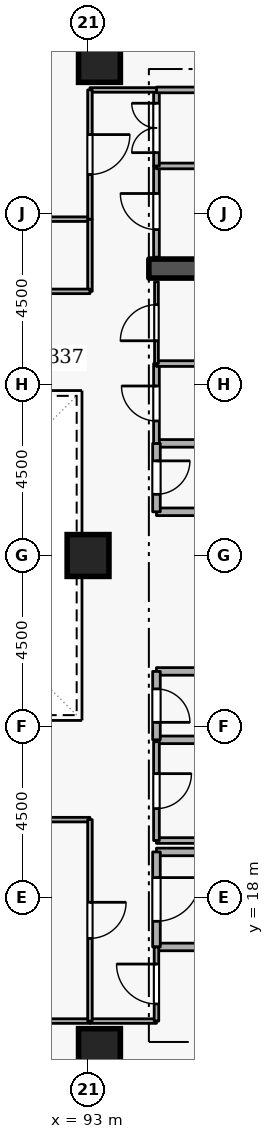
"""IFC4 building model, lengths in metres.
Left out: names, types, materials, properties, quantities, classifications, styles, units other than length and angle.
Written with IfcOpenShell. Run it as: python <this file> out.ifc"""

import sys

from ifc_helpers import new_model, si_unit, direction, frame, frame_2d, origin, origin_2d, place, context, subcontext, project, spatial, rectangle, extrude, element, fill, save


model = new_model("IFC4")
c1 = context("Model", 3, precision=1e-05, world=origin(), true_north=direction((0.0, 1.0)))
c2 = subcontext(c1, "Body", "Model", "MODEL_VIEW")
j1 = project(units=[si_unit("LENGTHUNIT", "METRE"), si_unit("PLANEANGLEUNIT", "RADIAN")], contexts=[c1])
p1 = place(None, origin())
s1 = spatial("IfcSite", under=j1, at=p1, CompositionType="ELEMENT")
p2 = place(p1, origin())
s2 = spatial("IfcBuilding", under=s1, at=p2, CompositionType="ELEMENT")
p3 = place(p2, frame((0.0, 0.0, 196.5)))
s3 = spatial("IfcBuildingStorey", under=s2, at=p3, CompositionType="ELEMENT", Elevation=196.5)
p4 = place(p3, frame((94.6, 34.55, 0.0), z_axis=(0.0, 0.0, 1.0), x_axis=(1.0, 0.0, 0.0)))
e1 = element("IfcWall", 1, at=p4, inside=s3, PredefinedType="SHEAR", context=c2, shape_type="SweptSolid", body=[
    extrude(rectangle(XDim=5.8, YDim=0.5, at=frame_2d((2.9, 0.0))), origin(), (0.0, 0.0, 1.0), 3.6),
])
for number, where, z_axis, x_axis in (
    (2, (93.3, 14.0, 0.0), (0.0, 0.0, 1.0), (1.0, 0.0, 0.0)),
    (3, (93.3, 40.0, 0.0), (0.0, 0.0, 1.0), (1.0, 0.0, 0.0)),
    (4, (93.0, 27.0, 0.0), (0.0, 0.0, 1.0), (1.0, 0.0, 0.0)),
):
    element("IfcColumn", number, at=place(p3, frame(where, z_axis=z_axis, x_axis=x_axis)), inside=s3, PredefinedType="COLUMN", context=c2, shape_type="SweptSolid", body=[
        extrude(rectangle(XDim=1.1, YDim=1.1, at=origin_2d()), origin(), (0.0, 0.0, 1.0), 3.6),
    ])
p5 = place(p3, frame((94.8, 16.7, 0.0), z_axis=(0.0, 0.0, 1.0), x_axis=(1.0, 0.0, 0.0)))
e5 = element("IfcWall", 5, at=p5, inside=s3, PredefinedType="STANDARD", context=c2, shape_type="SweptSolid", body=[
    extrude(rectangle(XDim=5.7, YDim=0.2, at=frame_2d((2.85, 0.0))), origin(), (0.0, 0.0, 1.0), 3.32),
])
p6 = place(p3, frame((97.1, 19.2, 0.0), z_axis=(0.0, 0.0, 1.0), x_axis=(-1.0, 0.0, 0.0)))
e6 = element("IfcWall", 6, at=p6, inside=s3, PredefinedType="STANDARD", context=c2, shape_type="SweptSolid", body=[
    extrude(rectangle(XDim=2.3, YDim=0.2, at=frame_2d((1.15, 0.0))), origin(), (0.0, 0.0, 1.0), 2.525),
])
p7 = place(p3, frame((94.8, 19.2, 0.0), z_axis=(0.0, 0.0, 1.0), x_axis=(0.0, -1.0, 0.0)))
e7 = element("IfcWall", 7, at=p7, inside=s3, PredefinedType="STANDARD", context=c2, shape_type="SweptSolid", body=[
    extrude(rectangle(XDim=2.5, YDim=0.2, at=frame_2d((1.25, 0.0))), origin(), (0.0, 0.0, 1.0), 3.32),
])
p8 = place(p7, frame((0.675, 0.0, 0.0)))
e8 = element("IfcOpeningElement", 8, at=p8, cuts=e7, PredefinedType="OPENING", context=c2, shape_type="SweptSolid", body=[
    extrude(rectangle(XDim=1.15, YDim=2.1, at=frame_2d((0.575, 1.05))), frame((0.0, 0.11, 0.0), z_axis=(0.0, -1.0, 0.0), x_axis=(1.0, 0.0, 0.0)), (0.0, 0.0, 1.0), 0.22),
])
for number, where, z_axis, x_axis in (
    (9, (94.8, 28.15, 0.0), (0.0, 0.0, 1.0), (1.0, 0.0, 0.0)),
    (10, (96.85, 29.95, 0.0), (0.0, 0.0, 1.0), (-1.0, 0.0, 0.0)),
):
    element("IfcWall", number, at=place(p3, frame(where, z_axis=z_axis, x_axis=x_axis)), inside=s3, PredefinedType="STANDARD", context=c2, shape_type="SweptSolid", body=[
        extrude(rectangle(XDim=2.05, YDim=0.2, at=frame_2d((1.025, 0.0))), origin(), (0.0, 0.0, 1.0), 3.32),
    ])
p9 = place(p3, frame((94.8, 29.95, 0.0), z_axis=(0.0, 0.0, 1.0), x_axis=(0.0, -1.0, 0.0)))
e11 = element("IfcWall", 11, at=p9, inside=s3, PredefinedType="STANDARD", context=c2, shape_type="SweptSolid", body=[
    extrude(rectangle(XDim=1.8, YDim=0.2, at=frame_2d((0.9, 0.0))), origin(), (0.0, 0.0, 1.0), 3.32),
])
p10 = place(p9, frame((0.46, 0.0, 0.0)))
e12 = element("IfcOpeningElement", 12, at=p10, cuts=e11, PredefinedType="OPENING", context=c2, shape_type="SweptSolid", body=[
    extrude(rectangle(XDim=0.88, YDim=2.04, at=frame_2d((0.44, 1.02))), frame((0.0, 0.11, 0.0), z_axis=(0.0, -1.0, 0.0), x_axis=(1.0, 0.0, 0.0)), (0.0, 0.0, 1.0), 0.22),
])
for number, where, z_axis, x_axis in (
    (13, (94.8, 22.15, 0.0), (0.0, 0.0, 1.0), (1.0, 0.0, 0.0)),
    (14, (96.85, 23.95, 0.0), (0.0, 0.0, 1.0), (-1.0, 0.0, 0.0)),
):
    element("IfcWall", number, at=place(p3, frame(where, z_axis=z_axis, x_axis=x_axis)), inside=s3, PredefinedType="STANDARD", context=c2, shape_type="SweptSolid", body=[
        extrude(rectangle(XDim=2.05, YDim=0.2, at=frame_2d((1.025, 0.0))), origin(), (0.0, 0.0, 1.0), 3.32),
    ])
p11 = place(p3, frame((94.8, 23.95, 0.0), z_axis=(0.0, 0.0, 1.0), x_axis=(0.0, -1.0, 0.0)))
e15 = element("IfcWall", 15, at=p11, inside=s3, PredefinedType="STANDARD", context=c2, shape_type="SweptSolid", body=[
    extrude(rectangle(XDim=1.8, YDim=0.2, at=frame_2d((0.9, 0.0))), origin(), (0.0, 0.0, 1.0), 3.32),
])
p12 = place(p11, frame((0.46, 0.0, 0.0)))
e16 = element("IfcOpeningElement", 16, at=p12, cuts=e15, PredefinedType="OPENING", context=c2, shape_type="SweptSolid", body=[
    extrude(rectangle(XDim=0.88, YDim=2.04, at=frame_2d((0.44, 1.02))), frame((0.0, 0.11, 0.0), z_axis=(0.0, -1.0, 0.0), x_axis=(1.0, 0.0, 0.0)), (0.0, 0.0, 1.0), 0.22),
])
p13 = place(p3, frame((94.8, 19.5, 0.0), z_axis=(0.0, 0.0, 1.0), x_axis=(1.0, 0.0, 0.0)))
e17 = element("IfcWall", 17, at=p13, inside=s3, PredefinedType="PARTITIONING", context=c2, shape_type="SweptSolid", body=[
    extrude(rectangle(XDim=2.05, YDim=0.15, at=frame_2d((1.025, 0.0))), origin(), (0.0, 0.0, 1.0), 2.525),
])
p14 = place(p3, frame((94.8, 22.1, 0.0), z_axis=(0.0, 0.0, 1.0), x_axis=(0.0, -1.0, 0.0)))
e18 = element("IfcWall", 18, at=p14, inside=s3, PredefinedType="PARTITIONING", context=c2, shape_type="SweptSolid", body=[
    extrude(rectangle(XDim=2.6, YDim=0.15, at=frame_2d((1.3, 0.0))), origin(), (0.0, 0.0, 1.0), 3.32),
])
p15 = place(p14, frame((0.84, 0.0, 0.0)))
e19 = element("IfcOpeningElement", 19, at=p15, cuts=e18, PredefinedType="OPENING", context=c2, shape_type="SweptSolid", body=[
    extrude(rectangle(XDim=0.92, YDim=2.08, at=frame_2d((0.46, 1.04))), frame((0.0, 0.085, 0.0), z_axis=(0.0, -1.0, 0.0), x_axis=(1.0, 0.0, 0.0)), (0.0, 0.0, 1.0), 0.17),
])
p16 = place(p3, frame((94.8, 29.95, 0.0), z_axis=(0.0, 0.0, 1.0), x_axis=(0.0, 1.0, 0.0)))
e20 = element("IfcWall", 20, at=p16, inside=s3, PredefinedType="PARTITIONING", context=c2, shape_type="SweptSolid", body=[
    extrude(rectangle(XDim=2.1, YDim=0.15, at=frame_2d((1.05, 0.0))), origin(), (0.0, 0.0, 1.0), 3.32),
])
p17 = place(p16, frame((0.59, 0.0, 0.0)))
e21 = element("IfcOpeningElement", 21, at=p17, cuts=e20, PredefinedType="OPENING", context=c2, shape_type="SweptSolid", body=[
    extrude(rectangle(XDim=0.92, YDim=2.08, at=frame_2d((0.46, 1.04))), frame((0.0, 0.085, 0.0), z_axis=(0.0, -1.0, 0.0), x_axis=(1.0, 0.0, 0.0)), (0.0, 0.0, 1.0), 0.17),
])
p18 = place(p3, frame((94.8, 32.05, 0.0), z_axis=(0.0, 0.0, 1.0), x_axis=(1.0, 0.0, 0.0)))
e22 = element("IfcWall", 22, at=p18, inside=s3, PredefinedType="PARTITIONING", context=c2, shape_type="SweptSolid", body=[
    extrude(rectangle(XDim=2.05, YDim=0.15, at=frame_2d((1.025, 0.0))), origin(), (0.0, 0.0, 1.0), 3.32),
])
p19 = place(p3, frame((94.8, 32.05, 0.0), z_axis=(0.0, 0.0, 1.0), x_axis=(0.0, 1.0, 0.0)))
e23 = element("IfcWall", 23, at=p19, inside=s3, PredefinedType="PARTITIONING", context=c2, shape_type="SweptSolid", body=[
    extrude(rectangle(XDim=2.15, YDim=0.1, at=frame_2d((1.075, 0.0))), origin(), (0.0, 0.0, 1.0), 3.32),
])
p20 = place(p19, frame((0.6, 0.0, 0.0)))
e24 = element("IfcOpeningElement", 24, at=p20, cuts=e23, PredefinedType="OPENING", context=c2, shape_type="SweptSolid", body=[
    extrude(rectangle(XDim=0.95, YDim=2.1, at=frame_2d((0.475, 1.05))), frame((0.0, 0.06, 0.0), z_axis=(0.0, -1.0, 0.0), x_axis=(1.0, 0.0, 0.0)), (0.0, 0.0, 1.0), 0.12),
])
p21 = place(p3, frame((94.8, 34.85, 0.0), z_axis=(0.0, 0.0, 1.0), x_axis=(0.0, 1.0, 0.0)))
e25 = element("IfcWall", 25, at=p21, inside=s3, PredefinedType="PARTITIONING", context=c2, shape_type="SweptSolid", body=[
    extrude(rectangle(XDim=2.4, YDim=0.15, at=frame_2d((1.2, 0.0))), origin(), (0.0, 0.0, 1.0), 3.32),
])
p22 = place(p21, frame((0.725, 0.0, 0.0)))
e26 = element("IfcOpeningElement", 26, at=p22, cuts=e25, PredefinedType="OPENING", context=c2, shape_type="SweptSolid", body=[
    extrude(rectangle(XDim=0.95, YDim=2.1, at=frame_2d((0.475, 1.05))), frame((0.0, 0.085, 0.0), z_axis=(0.0, -1.0, 0.0), x_axis=(1.0, 0.0, 0.0)), (0.0, 0.0, 1.0), 0.17),
])
p23 = place(p3, frame((94.8, 37.25, 0.0), z_axis=(0.0, 0.0, 1.0), x_axis=(1.0, 0.0, 0.0)))
e27 = element("IfcWall", 27, at=p23, inside=s3, PredefinedType="PARTITIONING", context=c2, shape_type="SweptSolid", body=[
    extrude(rectangle(XDim=5.65, YDim=0.15, at=frame_2d((2.825, 0.0))), origin(), (0.0, 0.0, 1.0), 3.32),
])
p24 = place(p3, frame((94.8, 37.25, 0.0), z_axis=(0.0, 0.0, 1.0), x_axis=(0.0, 1.0, 0.0)))
e28 = element("IfcWall", 28, at=p24, inside=s3, PredefinedType="PARTITIONING", context=c2, shape_type="SweptSolid", body=[
    extrude(rectangle(XDim=2.0, YDim=0.15, at=frame_2d((1.0, 0.0))), origin(), (0.0, 0.0, 1.0), 3.32),
])
p25 = place(p24, frame((0.35, 0.0, 0.0)))
e29 = element("IfcOpeningElement", 29, at=p25, cuts=e28, PredefinedType="OPENING", context=c2, shape_type="SweptSolid", body=[
    extrude(rectangle(XDim=1.3, YDim=2.12, at=frame_2d((0.65, 1.06))), frame((0.0, 0.085, 0.0), z_axis=(0.0, -1.0, 0.0), x_axis=(1.0, 0.0, 0.0)), (0.0, 0.0, 1.0), 0.17),
])
p26 = place(p3, frame((94.8, 39.25, 0.0), z_axis=(0.0, 0.0, 1.0), x_axis=(1.0, 0.0, 0.0)))
e30 = element("IfcWall", 30, at=p26, inside=s3, PredefinedType="PARTITIONING", context=c2, shape_type="SweptSolid", body=[
    extrude(rectangle(XDim=5.65, YDim=0.15, at=frame_2d((2.825, 0.0))), origin(), (0.0, 0.0, 1.0), 3.32),
])
p27 = place(p3, frame((88.5, 14.75, 0.0), z_axis=(0.0, 0.0, 1.0), x_axis=(1.0, 0.0, 0.0)))
e31 = element("IfcWall", 31, at=p27, inside=s3, PredefinedType="PARTITIONING", context=c2, shape_type="SweptSolid", body=[
    extrude(rectangle(XDim=4.55, YDim=0.12, at=frame_2d((2.275, 0.0))), origin(), (0.0, 0.0, 1.0), 3.32),
])
p28 = place(p3, frame((93.05, 14.75, 0.0), z_axis=(0.0, 0.0, 1.0), x_axis=(1.0, 0.0, 0.0)))
e32 = element("IfcWall", 32, at=p28, inside=s3, PredefinedType="PARTITIONING", context=c2, shape_type="SweptSolid", body=[
    extrude(rectangle(XDim=1.75, YDim=0.12, at=frame_2d((0.875, 0.0))), origin(), (0.0, 0.0, 1.0), 3.32),
])
p29 = place(p3, frame((94.8, 14.75, 0.0), z_axis=(0.0, 0.0, 1.0), x_axis=(0.0, 1.0, 0.0)))
e33 = element("IfcWall", 33, at=p29, inside=s3, PredefinedType="PARTITIONING", context=c2, shape_type="SweptSolid", body=[
    extrude(rectangle(XDim=1.95, YDim=0.12, at=frame_2d((0.975, 0.0))), origin(), (0.0, 0.0, 1.0), 3.32),
])
p30 = place(p29, frame((0.45, 0.0, 0.0)))
e34 = element("IfcOpeningElement", 34, at=p30, cuts=e33, PredefinedType="OPENING", context=c2, shape_type="SweptSolid", body=[
    extrude(rectangle(XDim=1.05, YDim=2.1, at=frame_2d((0.525, 1.05))), frame((0.0, 0.07, 0.0), z_axis=(0.0, -1.0, 0.0), x_axis=(1.0, 0.0, 0.0)), (0.0, 0.0, 1.0), 0.14),
])
p31 = place(p3, frame((88.5, 20.05, 0.0), z_axis=(0.0, 0.0, 1.0), x_axis=(1.0, 0.0, 0.0)))
e35 = element("IfcWall", 35, at=p31, inside=s3, PredefinedType="PARTITIONING", context=c2, shape_type="SweptSolid", body=[
    extrude(rectangle(XDim=4.55, YDim=0.12, at=frame_2d((2.275, 0.0))), origin(), (0.0, 0.0, 1.0), 3.32),
])
p32 = place(p3, frame((93.05, 20.05, 0.0), z_axis=(0.0, 0.0, 1.0), x_axis=(0.0, -1.0, 0.0)))
e36 = element("IfcWall", 36, at=p32, inside=s3, PredefinedType="PARTITIONING", context=c2, shape_type="SweptSolid", body=[
    extrude(rectangle(XDim=5.3, YDim=0.12, at=frame_2d((2.65, 0.0))), origin(), (0.0, 0.0, 1.0), 3.32),
])
p33 = place(p32, frame((2.175, 0.0, 0.0)))
e37 = element("IfcOpeningElement", 37, at=p33, cuts=e36, PredefinedType="OPENING", context=c2, shape_type="SweptSolid", body=[
    extrude(rectangle(XDim=0.95, YDim=2.1, at=frame_2d((0.475, 1.05))), frame((0.0, 0.07, 0.0), z_axis=(0.0, -1.0, 0.0), x_axis=(1.0, 0.0, 0.0)), (0.0, 0.0, 1.0), 0.14),
])
p34 = place(p3, frame((88.5, 35.85, 0.0), z_axis=(0.0, 0.0, 1.0), x_axis=(1.0, 0.0, 0.0)))
e38 = element("IfcWall", 38, at=p34, inside=s3, PredefinedType="PARTITIONING", context=c2, shape_type="SweptSolid", body=[
    extrude(rectangle(XDim=4.55, YDim=0.12, at=frame_2d((2.275, 0.0))), origin(), (0.0, 0.0, 1.0), 3.32),
])
p35 = place(p3, frame((93.05, 35.85, 0.0), z_axis=(0.0, 0.0, 1.0), x_axis=(0.0, -1.0, 0.0)))
e39 = element("IfcWall", 39, at=p35, inside=s3, PredefinedType="PARTITIONING", context=c2, shape_type="SweptSolid", body=[
    extrude(rectangle(XDim=1.9, YDim=0.12, at=frame_2d((0.95, 0.0))), origin(), (0.0, 0.0, 1.0), 3.32),
])
p36 = place(p3, frame((93.05, 33.95, 0.0), z_axis=(0.0, 0.0, 1.0), x_axis=(-1.0, 0.0, 0.0)))
e40 = element("IfcWall", 40, at=p36, inside=s3, PredefinedType="PARTITIONING", context=c2, shape_type="SweptSolid", body=[
    extrude(rectangle(XDim=4.55, YDim=0.12, at=frame_2d((2.275, 0.0))), origin(), (0.0, 0.0, 1.0), 3.32),
])
p37 = place(p36, frame((1.8, 0.0, 0.0)))
e41 = element("IfcOpeningElement", 41, at=p37, cuts=e40, PredefinedType="OPENING", context=c2, shape_type="SweptSolid", body=[
    extrude(rectangle(XDim=0.95, YDim=2.1, at=frame_2d((0.475, 1.05))), frame((0.0, 0.07, 0.0), z_axis=(0.0, -1.0, 0.0), x_axis=(1.0, 0.0, 0.0)), (0.0, 0.0, 1.0), 0.14),
])
p38 = place(p3, frame((94.8, 39.25, 0.0), z_axis=(0.0, 0.0, 1.0), x_axis=(-1.0, 0.0, 0.0)))
e42 = element("IfcWall", 42, at=p38, inside=s3, PredefinedType="PARTITIONING", context=c2, shape_type="SweptSolid", body=[
    extrude(rectangle(XDim=1.75, YDim=0.12, at=frame_2d((0.875, 0.0))), origin(), (0.0, 0.0, 1.0), 3.32),
])
p39 = place(p3, frame((93.05, 39.25, 0.0), z_axis=(0.0, 0.0, 1.0), x_axis=(0.0, -1.0, 0.0)))
e43 = element("IfcWall", 43, at=p39, inside=s3, PredefinedType="PARTITIONING", context=c2, shape_type="SweptSolid", body=[
    extrude(rectangle(XDim=3.4, YDim=0.12, at=frame_2d((1.7, 0.0))), origin(), (0.0, 0.0, 1.0), 3.32),
])
p40 = place(p39, frame((1.175, 0.0, 0.0)))
e44 = element("IfcOpeningElement", 44, at=p40, cuts=e43, PredefinedType="OPENING", context=c2, shape_type="SweptSolid", body=[
    extrude(rectangle(XDim=1.05, YDim=2.1, at=frame_2d((0.525, 1.05))), frame((0.0, 0.07, 0.0), z_axis=(0.0, -1.0, 0.0), x_axis=(1.0, 0.0, 0.0)), (0.0, 0.0, 1.0), 0.14),
])
p41 = place(p8, origin())
e45 = element("IfcDoor", 45, at=p41, inside=s3, OperationType="SINGLE_SWING_LEFT", PredefinedType="DOOR", context=c2, shape_type="SweptSolid", body=[
    extrude(rectangle(XDim=1.15, YDim=2.1, at=frame_2d((0.575, 1.05))), frame((0.0, 0.025, 0.0), z_axis=(0.0, -1.0, 0.0), x_axis=(1.0, 0.0, 0.0)), (0.0, 0.0, 1.0), 0.05),
])
fill(e8, e45)
p42 = place(p10, origin())
e46 = element("IfcDoor", 46, at=p42, inside=s3, OperationType="SINGLE_SWING_LEFT", PredefinedType="DOOR", context=c2, shape_type="SweptSolid", body=[
    extrude(rectangle(XDim=0.88, YDim=2.04, at=frame_2d((0.44, 1.02))), frame((0.0, 0.025, 0.0), z_axis=(0.0, -1.0, 0.0), x_axis=(1.0, 0.0, 0.0)), (0.0, 0.0, 1.0), 0.05),
])
fill(e12, e46)
p43 = place(p12, origin())
e47 = element("IfcDoor", 47, at=p43, inside=s3, OperationType="SINGLE_SWING_RIGHT", PredefinedType="DOOR", context=c2, shape_type="SweptSolid", body=[
    extrude(rectangle(XDim=0.88, YDim=2.04, at=frame_2d((0.44, 1.02))), frame((0.0, 0.025, 0.0), z_axis=(0.0, -1.0, 0.0), x_axis=(1.0, 0.0, 0.0)), (0.0, 0.0, 1.0), 0.05),
])
fill(e16, e47)
p44 = place(p15, origin())
e48 = element("IfcDoor", 48, at=p44, inside=s3, OperationType="SINGLE_SWING_LEFT", PredefinedType="DOOR", context=c2, shape_type="SweptSolid", body=[
    extrude(rectangle(XDim=0.92, YDim=2.08, at=frame_2d((0.46, 1.04))), frame((0.0, 0.025, 0.0), z_axis=(0.0, -1.0, 0.0), x_axis=(1.0, 0.0, 0.0)), (0.0, 0.0, 1.0), 0.05),
])
fill(e19, e48)
p45 = place(p17, origin())
e49 = element("IfcDoor", 49, at=p45, inside=s3, OperationType="SINGLE_SWING_RIGHT", PredefinedType="DOOR", context=c2, shape_type="SweptSolid", body=[
    extrude(rectangle(XDim=0.92, YDim=2.08, at=frame_2d((0.46, 1.04))), frame((0.0, 0.025, 0.0), z_axis=(0.0, -1.0, 0.0), x_axis=(1.0, 0.0, 0.0)), (0.0, 0.0, 1.0), 0.05),
])
fill(e21, e49)
p46 = place(p20, origin())
e50 = element("IfcDoor", 50, at=p46, inside=s3, OperationType="SINGLE_SWING_LEFT", PredefinedType="DOOR", context=c2, shape_type="SweptSolid", body=[
    extrude(rectangle(XDim=0.95, YDim=2.1, at=frame_2d((0.475, 1.05))), frame((0.0, 0.025, 0.0), z_axis=(0.0, -1.0, 0.0), x_axis=(1.0, 0.0, 0.0)), (0.0, 0.0, 1.0), 0.05),
])
fill(e24, e50)
p47 = place(p22, origin())
e51 = element("IfcDoor", 51, at=p47, inside=s3, OperationType="SINGLE_SWING_RIGHT", PredefinedType="DOOR", context=c2, shape_type="SweptSolid", body=[
    extrude(rectangle(XDim=0.95, YDim=2.1, at=frame_2d((0.475, 1.05))), frame((0.0, 0.025, 0.0), z_axis=(0.0, -1.0, 0.0), x_axis=(1.0, 0.0, 0.0)), (0.0, 0.0, 1.0), 0.05),
])
fill(e26, e51)
p48 = place(p25, origin())
e52 = element("IfcDoor", 52, at=p48, inside=s3, OperationType="DOUBLE_DOOR_SINGLE_SWING", PredefinedType="DOOR", context=c2, shape_type="SweptSolid", body=[
    extrude(rectangle(XDim=1.3, YDim=2.12, at=frame_2d((0.65, 1.06))), frame((0.0, 0.025, 0.0), z_axis=(0.0, -1.0, 0.0), x_axis=(1.0, 0.0, 0.0)), (0.0, 0.0, 1.0), 0.05),
])
fill(e29, e52)
p49 = place(p30, origin())
e53 = element("IfcDoor", 53, at=p49, inside=s3, OperationType="SINGLE_SWING_RIGHT", PredefinedType="DOOR", context=c2, shape_type="SweptSolid", body=[
    extrude(rectangle(XDim=1.05, YDim=2.1, at=frame_2d((0.525, 1.05))), frame((0.0, 0.025, 0.0), z_axis=(0.0, -1.0, 0.0), x_axis=(1.0, 0.0, 0.0)), (0.0, 0.0, 1.0), 0.05),
])
fill(e34, e53)
p50 = place(p33, origin())
e54 = element("IfcDoor", 54, at=p50, inside=s3, OperationType="SINGLE_SWING_LEFT", PredefinedType="DOOR", context=c2, shape_type="SweptSolid", body=[
    extrude(rectangle(XDim=0.95, YDim=2.1, at=frame_2d((0.475, 1.05))), frame((0.0, 0.025, 0.0), z_axis=(0.0, -1.0, 0.0), x_axis=(1.0, 0.0, 0.0)), (0.0, 0.0, 1.0), 0.05),
])
fill(e37, e54)
p51 = place(p40, origin())
e55 = element("IfcDoor", 55, at=p51, inside=s3, OperationType="SINGLE_SWING_LEFT", PredefinedType="DOOR", context=c2, shape_type="SweptSolid", body=[
    extrude(rectangle(XDim=1.05, YDim=2.1, at=frame_2d((0.525, 1.05))), frame((0.0, 0.025, 0.0), z_axis=(0.0, -1.0, 0.0), x_axis=(1.0, 0.0, 0.0)), (0.0, 0.0, 1.0), 0.05),
])
fill(e44, e55)
save(model, sys.argv[1])
